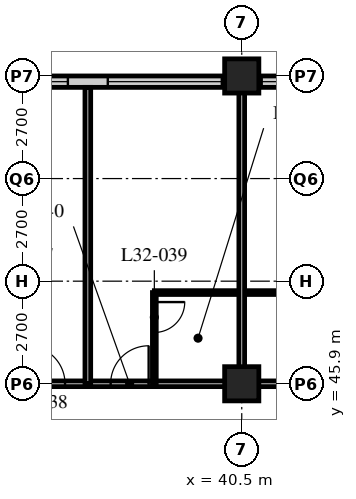
"""IFC4 building model, lengths in metres.
Left out: names, types, materials, properties, quantities, classifications, styles, units other than length and angle.
Written with IfcOpenShell. Run it as: python <this file> out.ifc"""

import sys

from ifc_helpers import new_model, si_unit, direction, frame, frame_2d, origin, origin_2d, place, context, subcontext, project, spatial, rectangle, hollow_rectangle, extrude, element, fill, save


model = new_model("IFC4")
c1 = context("Model", 3, precision=1e-05, world=origin(), true_north=direction((0.0, 1.0)))
c2 = subcontext(c1, "Body", "Model", "MODEL_VIEW")
j1 = project(units=[si_unit("LENGTHUNIT", "METRE"), si_unit("PLANEANGLEUNIT", "RADIAN")], contexts=[c1])
p1 = place(None, origin())
s1 = spatial("IfcSite", under=j1, at=p1, CompositionType="ELEMENT")
p2 = place(p1, origin())
s2 = spatial("IfcBuilding", under=s1, at=p2, CompositionType="ELEMENT")
p3 = place(p2, frame((0.0, 0.0, 127.2)))
s3 = spatial("IfcBuildingStorey", under=s2, at=p3, CompositionType="ELEMENT", Elevation=127.2)
for number, where, z_axis, x_axis in (
    (1, (40.5, 45.9, 0.0), (0.0, 0.0, 1.0), (1.0, 0.0, 0.0)),
    (2, (40.5, 54.0, 0.0), (0.0, 0.0, 1.0), (1.0, 0.0, 0.0)),
):
    element("IfcColumn", number, at=place(p3, frame(where, z_axis=z_axis, x_axis=x_axis)), inside=s3, PredefinedType="COLUMN", context=c2, shape_type="SweptSolid", body=[
        extrude(hollow_rectangle(XDim=0.9, YDim=0.9, WallThickness=0.09, at=origin_2d()), origin(), (0.0, 0.0, 1.0), 3.4),
    ])
p4 = place(p3, frame((48.3, 53.85, 0.0), z_axis=(0.0, 0.0, 1.0), x_axis=(-1.0, 0.0, 0.0)))
e3 = element("IfcWall", 3, at=p4, inside=s3, PredefinedType="SOLIDWALL", context=c2, shape_type="SweptSolid", body=[
    extrude(rectangle(XDim=40.2, YDim=0.3, at=frame_2d((20.1, 0.0))), origin(), (0.0, 0.0, 1.0), 3.19),
])
p5 = place(p4, frame((0.225, 0.0, 0.9)))
e4 = element("IfcOpeningElement", 4, at=p5, cuts=e3, PredefinedType="OPENING", context=c2, shape_type="SweptSolid", body=[
    extrude(rectangle(XDim=3.0, YDim=2.0, at=frame_2d((1.5, 1.0))), frame((0.0, 0.16, 0.0), z_axis=(0.0, -1.0, 0.0), x_axis=(1.0, 0.0, 0.0)), (0.0, 0.0, 1.0), 0.32),
])
p6 = place(p4, frame((4.275, 0.0, 0.9)))
e5 = element("IfcOpeningElement", 5, at=p6, cuts=e3, PredefinedType="OPENING", context=c2, shape_type="SweptSolid", body=[
    extrude(rectangle(XDim=3.0, YDim=2.0, at=frame_2d((1.5, 1.0))), frame((0.0, 0.16, 0.0), z_axis=(0.0, -1.0, 0.0), x_axis=(1.0, 0.0, 0.0)), (0.0, 0.0, 1.0), 0.32),
])
p7 = place(p4, frame((8.325, 0.0, 0.9)))
e6 = element("IfcOpeningElement", 6, at=p7, cuts=e3, PredefinedType="OPENING", context=c2, shape_type="SweptSolid", body=[
    extrude(rectangle(XDim=3.0, YDim=2.0, at=frame_2d((1.5, 1.0))), frame((0.0, 0.16, 0.0), z_axis=(0.0, -1.0, 0.0), x_axis=(1.0, 0.0, 0.0)), (0.0, 0.0, 1.0), 0.32),
])
p8 = place(p4, frame((12.375, 0.0, 0.9)))
e7 = element("IfcOpeningElement", 7, at=p8, cuts=e3, PredefinedType="OPENING", context=c2, shape_type="SweptSolid", body=[
    extrude(rectangle(XDim=3.0, YDim=2.0, at=frame_2d((1.5, 1.0))), frame((0.0, 0.16, 0.0), z_axis=(0.0, -1.0, 0.0), x_axis=(1.0, 0.0, 0.0)), (0.0, 0.0, 1.0), 0.32),
])
p9 = place(p4, frame((16.425, 0.0, 0.9)))
e8 = element("IfcOpeningElement", 8, at=p9, cuts=e3, PredefinedType="OPENING", context=c2, shape_type="SweptSolid", body=[
    extrude(rectangle(XDim=3.0, YDim=2.0, at=frame_2d((1.5, 1.0))), frame((0.0, 0.16, 0.0), z_axis=(0.0, -1.0, 0.0), x_axis=(1.0, 0.0, 0.0)), (0.0, 0.0, 1.0), 0.32),
])
p10 = place(p4, frame((20.475, 0.0, 0.9)))
e9 = element("IfcOpeningElement", 9, at=p10, cuts=e3, PredefinedType="OPENING", context=c2, shape_type="SweptSolid", body=[
    extrude(rectangle(XDim=3.0, YDim=2.0, at=frame_2d((1.5, 1.0))), frame((0.0, 0.16, 0.0), z_axis=(0.0, -1.0, 0.0), x_axis=(1.0, 0.0, 0.0)), (0.0, 0.0, 1.0), 0.32),
])
p11 = place(p4, frame((24.525, 0.0, 0.9)))
e10 = element("IfcOpeningElement", 10, at=p11, cuts=e3, PredefinedType="OPENING", context=c2, shape_type="SweptSolid", body=[
    extrude(rectangle(XDim=3.0, YDim=2.0, at=frame_2d((1.5, 1.0))), frame((0.0, 0.16, 0.0), z_axis=(0.0, -1.0, 0.0), x_axis=(1.0, 0.0, 0.0)), (0.0, 0.0, 1.0), 0.32),
])
p12 = place(p4, frame((28.575, 0.0, 0.9)))
e11 = element("IfcOpeningElement", 11, at=p12, cuts=e3, PredefinedType="OPENING", context=c2, shape_type="SweptSolid", body=[
    extrude(rectangle(XDim=3.0, YDim=2.0, at=frame_2d((1.5, 1.0))), frame((0.0, 0.16, 0.0), z_axis=(0.0, -1.0, 0.0), x_axis=(1.0, 0.0, 0.0)), (0.0, 0.0, 1.0), 0.32),
])
p13 = place(p4, frame((32.625, 0.0, 0.9)))
e12 = element("IfcOpeningElement", 12, at=p13, cuts=e3, PredefinedType="OPENING", context=c2, shape_type="SweptSolid", body=[
    extrude(rectangle(XDim=3.0, YDim=2.0, at=frame_2d((1.5, 1.0))), frame((0.0, 0.16, 0.0), z_axis=(0.0, -1.0, 0.0), x_axis=(1.0, 0.0, 0.0)), (0.0, 0.0, 1.0), 0.32),
])
p14 = place(p4, frame((36.675, 0.0, 0.9)))
e13 = element("IfcOpeningElement", 13, at=p14, cuts=e3, PredefinedType="OPENING", context=c2, shape_type="SweptSolid", body=[
    extrude(rectangle(XDim=3.0, YDim=2.0, at=frame_2d((1.5, 1.0))), frame((0.0, 0.16, 0.0), z_axis=(0.0, -1.0, 0.0), x_axis=(1.0, 0.0, 0.0)), (0.0, 0.0, 1.0), 0.32),
])
p15 = place(p3, frame((8.1, 45.9, 0.0), z_axis=(0.0, 0.0, 1.0), x_axis=(1.0, 0.0, 0.0)))
e14 = element("IfcWall", 14, at=p15, inside=s3, PredefinedType="PARTITIONING", context=c2, shape_type="SweptSolid", body=[
    extrude(rectangle(XDim=40.5, YDim=0.15, at=frame_2d((20.25, 0.0))), origin(), (0.0, 0.0, 1.0), 2.578),
])
p16 = place(p15, frame((9.625, 0.0, 0.0)))
e15 = element("IfcOpeningElement", 15, at=p16, cuts=e14, PredefinedType="OPENING", context=c2, shape_type="SweptSolid", body=[
    extrude(rectangle(XDim=1.0, YDim=2.1, at=frame_2d((0.5, 1.05))), frame((0.0, 0.085, 0.0), z_axis=(0.0, -1.0, 0.0), x_axis=(1.0, 0.0, 0.0)), (0.0, 0.0, 1.0), 0.17),
])
p17 = place(p15, frame((21.65, 0.0, 0.0)))
e16 = element("IfcOpeningElement", 16, at=p17, cuts=e14, PredefinedType="OPENING", context=c2, shape_type="SweptSolid", body=[
    extrude(rectangle(XDim=1.0, YDim=2.1, at=frame_2d((0.5, 1.05))), frame((0.0, 0.085, 0.0), z_axis=(0.0, -1.0, 0.0), x_axis=(1.0, 0.0, 0.0)), (0.0, 0.0, 1.0), 0.17),
])
p18 = place(p15, frame((26.75, 0.0, 0.0)))
e17 = element("IfcOpeningElement", 17, at=p18, cuts=e14, PredefinedType="OPENING", context=c2, shape_type="SweptSolid", body=[
    extrude(rectangle(XDim=1.0, YDim=2.1, at=frame_2d((0.5, 1.05))), frame((0.0, 0.085, 0.0), z_axis=(0.0, -1.0, 0.0), x_axis=(1.0, 0.0, 0.0)), (0.0, 0.0, 1.0), 0.17),
])
p19 = place(p15, frame((28.95, 0.0, 0.0)))
e18 = element("IfcOpeningElement", 18, at=p19, cuts=e14, PredefinedType="OPENING", context=c2, shape_type="SweptSolid", body=[
    extrude(rectangle(XDim=1.0, YDim=2.1, at=frame_2d((0.5, 1.05))), frame((0.0, 0.085, 0.0), z_axis=(0.0, -1.0, 0.0), x_axis=(1.0, 0.0, 0.0)), (0.0, 0.0, 1.0), 0.17),
])
p20 = place(p15, frame((34.85, 0.0, 0.0)))
e19 = element("IfcOpeningElement", 19, at=p20, cuts=e14, PredefinedType="OPENING", context=c2, shape_type="SweptSolid", body=[
    extrude(rectangle(XDim=1.0, YDim=2.1, at=frame_2d((0.5, 1.05))), frame((0.0, 0.085, 0.0), z_axis=(0.0, -1.0, 0.0), x_axis=(1.0, 0.0, 0.0)), (0.0, 0.0, 1.0), 0.17),
])
p21 = place(p15, frame((36.875, 0.0, 0.0)))
e20 = element("IfcOpeningElement", 20, at=p21, cuts=e14, PredefinedType="OPENING", context=c2, shape_type="SweptSolid", body=[
    extrude(rectangle(XDim=1.0, YDim=2.1, at=frame_2d((0.5, 1.05))), frame((0.0, 0.085, 0.0), z_axis=(0.0, -1.0, 0.0), x_axis=(1.0, 0.0, 0.0)), (0.0, 0.0, 1.0), 0.17),
])
p22 = place(p15, frame((2.625, 0.0, 0.0)))
e21 = element("IfcOpeningElement", 21, at=p22, cuts=e14, PredefinedType="OPENING", context=c2, shape_type="SweptSolid", body=[
    extrude(rectangle(XDim=1.0, YDim=2.1, at=frame_2d((0.5, 1.05))), frame((0.0, 0.085, 0.0), z_axis=(0.0, -1.0, 0.0), x_axis=(1.0, 0.0, 0.0)), (0.0, 0.0, 1.0), 0.17),
])
p23 = place(p3, frame((36.45, 45.9, 0.0), z_axis=(0.0, 0.0, 1.0), x_axis=(0.0, 1.0, 0.0)))
e22 = element("IfcWall", 22, at=p23, inside=s3, PredefinedType="PARTITIONING", context=c2, shape_type="SweptSolid", body=[
    extrude(rectangle(XDim=7.8, YDim=0.15, at=frame_2d((3.9, 0.0))), origin(), (0.0, 0.0, 1.0), 3.19),
])
p24 = place(p3, frame((38.2, 48.3, 0.0), z_axis=(0.0, 0.0, 1.0), x_axis=(1.0, 0.0, 0.0)))
e23 = element("IfcWall", 23, at=p24, inside=s3, PredefinedType="PARTITIONING", context=c2, shape_type="SweptSolid", body=[
    extrude(rectangle(XDim=4.6, YDim=0.1, at=frame_2d((2.3, 0.0))), origin(), (0.0, 0.0, 1.0), 3.19),
])
p25 = place(p3, frame((38.2, 45.9, 0.0), z_axis=(0.0, 0.0, 1.0), x_axis=(0.0, 1.0, 0.0)))
e24 = element("IfcWall", 24, at=p25, inside=s3, PredefinedType="PARTITIONING", context=c2, shape_type="SweptSolid", body=[
    extrude(rectangle(XDim=2.4, YDim=0.1, at=frame_2d((1.2, 0.0))), origin(), (0.0, 0.0, 1.0), 3.19),
])
p26 = place(p25, frame((1.35, 0.0, 0.0)))
e25 = element("IfcOpeningElement", 25, at=p26, cuts=e24, PredefinedType="OPENING", context=c2, shape_type="SweptSolid", body=[
    extrude(rectangle(XDim=0.8, YDim=2.1, at=frame_2d((0.4, 1.05))), frame((0.0, 0.06, 0.0), z_axis=(0.0, -1.0, 0.0), x_axis=(1.0, 0.0, 0.0)), (0.0, 0.0, 1.0), 0.12),
])
p27 = place(p3, frame((40.5, 45.9, 0.0), z_axis=(0.0, 0.0, 1.0), x_axis=(0.0, 1.0, 0.0)))
e26 = element("IfcWall", 26, at=p27, inside=s3, PredefinedType="PARTITIONING", context=c2, shape_type="SweptSolid", body=[
    extrude(rectangle(XDim=7.8, YDim=0.15, at=frame_2d((3.9, 0.0))), origin(), (0.0, 0.0, 1.0), 2.578),
])
p28 = place(p6, origin())
e27 = element("IfcWindow", 27, at=p28, inside=s3, PartitioningType="SINGLE_PANEL", PredefinedType="WINDOW", context=c2, shape_type="SweptSolid", body=[
    extrude(rectangle(XDim=3.0, YDim=2.0, at=frame_2d((1.5, 1.0))), frame((0.0, 0.03, 0.0), z_axis=(0.0, -1.0, 0.0), x_axis=(1.0, 0.0, 0.0)), (0.0, 0.0, 1.0), 0.06),
])
fill(e5, e27)
p29 = place(p7, origin())
e28 = element("IfcWindow", 28, at=p29, inside=s3, PartitioningType="SINGLE_PANEL", PredefinedType="WINDOW", context=c2, shape_type="SweptSolid", body=[
    extrude(rectangle(XDim=3.0, YDim=2.0, at=frame_2d((1.5, 1.0))), frame((0.0, 0.03, 0.0), z_axis=(0.0, -1.0, 0.0), x_axis=(1.0, 0.0, 0.0)), (0.0, 0.0, 1.0), 0.06),
])
fill(e6, e28)
p30 = place(p8, origin())
e29 = element("IfcWindow", 29, at=p30, inside=s3, PartitioningType="SINGLE_PANEL", PredefinedType="WINDOW", context=c2, shape_type="SweptSolid", body=[
    extrude(rectangle(XDim=3.0, YDim=2.0, at=frame_2d((1.5, 1.0))), frame((0.0, 0.03, 0.0), z_axis=(0.0, -1.0, 0.0), x_axis=(1.0, 0.0, 0.0)), (0.0, 0.0, 1.0), 0.06),
])
fill(e7, e29)
p31 = place(p18, origin())
e30 = element("IfcDoor", 30, at=p31, inside=s3, OperationType="SINGLE_SWING_LEFT", PredefinedType="DOOR", context=c2, shape_type="SweptSolid", body=[
    extrude(rectangle(XDim=1.0, YDim=2.1, at=frame_2d((0.5, 1.05))), frame((0.0, 0.025, 0.0), z_axis=(0.0, -1.0, 0.0), x_axis=(1.0, 0.0, 0.0)), (0.0, 0.0, 1.0), 0.05),
])
fill(e17, e30)
p32 = place(p26, origin())
e31 = element("IfcDoor", 31, at=p32, inside=s3, OperationType="SINGLE_SWING_LEFT", PredefinedType="DOOR", context=c2, shape_type="SweptSolid", body=[
    extrude(rectangle(XDim=0.8, YDim=2.1, at=frame_2d((0.4, 1.05))), frame((0.0, 0.025, 0.0), z_axis=(0.0, -1.0, 0.0), x_axis=(1.0, 0.0, 0.0)), (0.0, 0.0, 1.0), 0.05),
])
fill(e25, e31)
p33 = place(p19, origin())
e32 = element("IfcDoor", 32, at=p33, inside=s3, OperationType="SINGLE_SWING_RIGHT", PredefinedType="DOOR", context=c2, shape_type="SweptSolid", body=[
    extrude(rectangle(XDim=1.0, YDim=2.1, at=frame_2d((0.5, 1.05))), frame((0.0, 0.025, 0.0), z_axis=(0.0, -1.0, 0.0), x_axis=(1.0, 0.0, 0.0)), (0.0, 0.0, 1.0), 0.05),
])
fill(e18, e32)
save(model, sys.argv[1])
